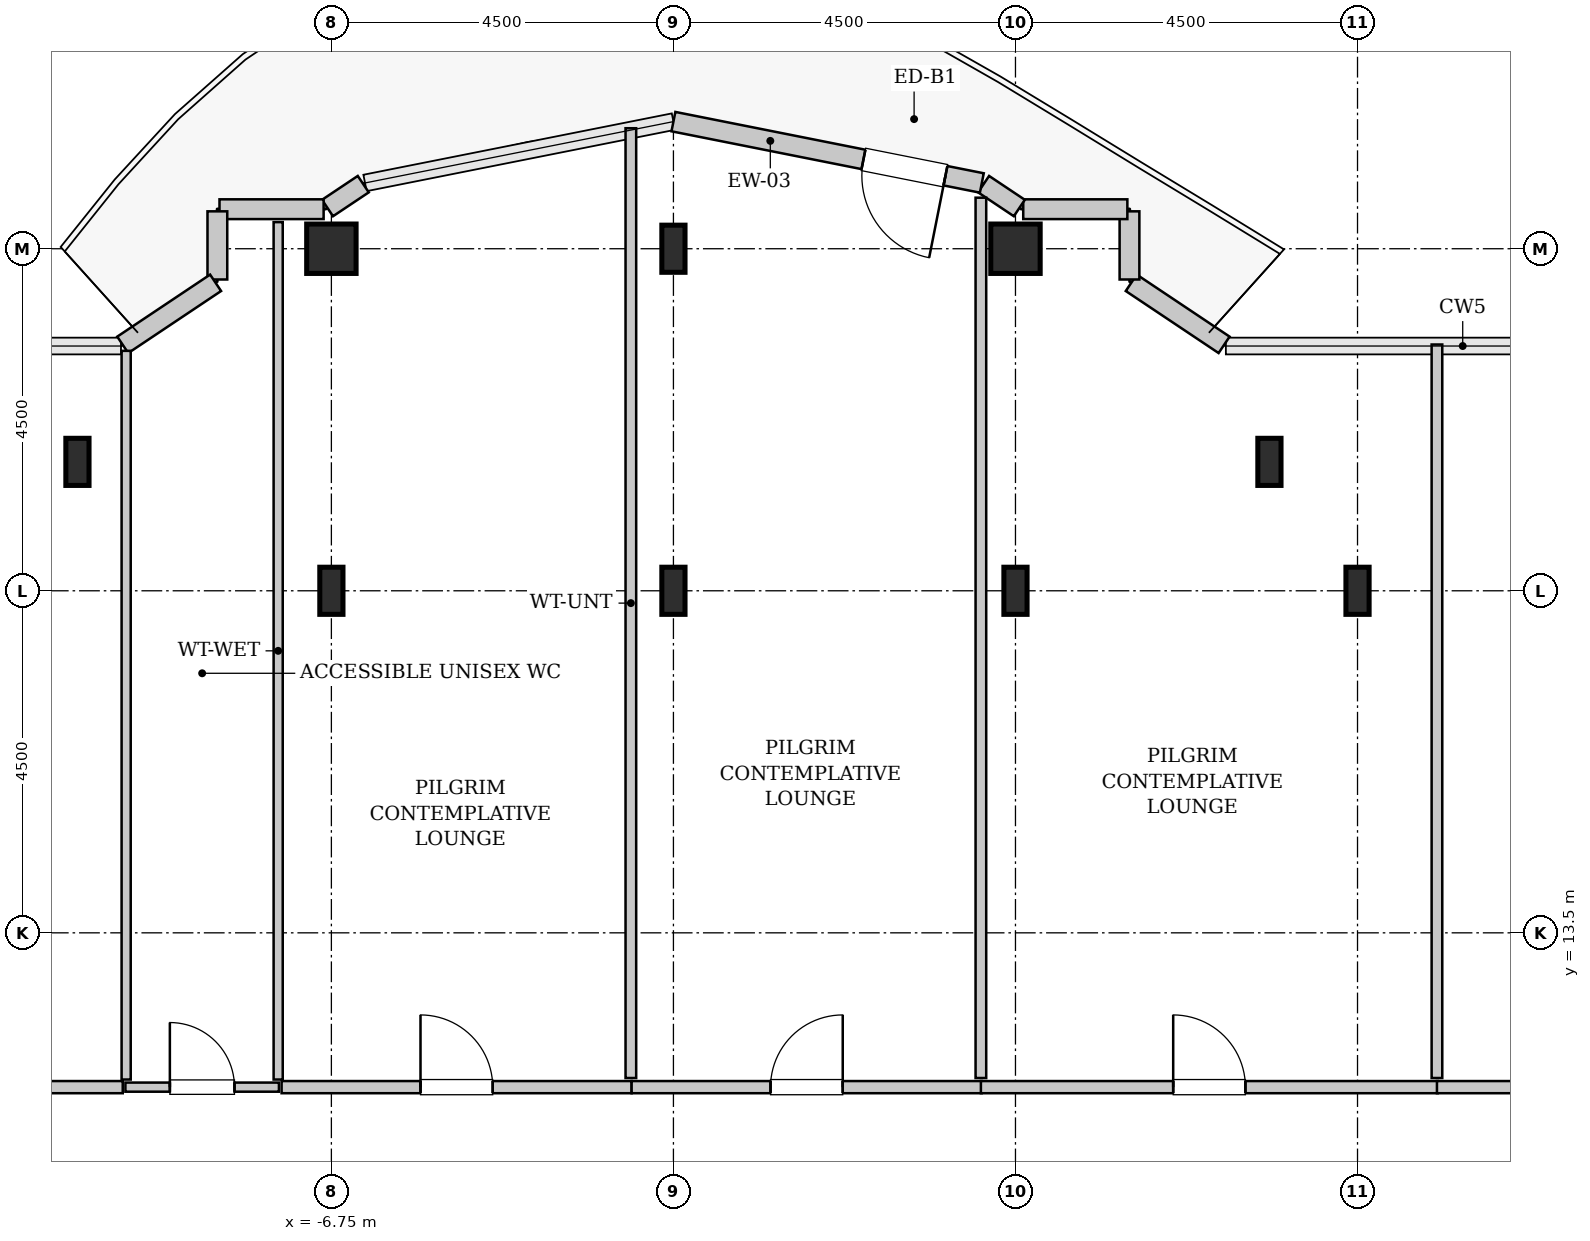
"""IFC4 building model, lengths in metres.
Left out: names, types, materials, properties, quantities, classifications, styles, units other than length and angle.
Written with IfcOpenShell. Run it as: python <this file> out.ifc"""

import sys

from ifc_helpers import new_model, si_unit, direction, frame, frame_2d, origin, origin_2d, place, context, subcontext, project, spatial, rectangle, hollow_rectangle, i_section, extrude, source, transform, mapped, element, fill, save


model = new_model("IFC4")
c1 = context("Model", 3, precision=1e-05, world=origin(), true_north=direction((0.0, 1.0)))
c2 = subcontext(c1, "Body", "Model", "MODEL_VIEW")
j1 = project(units=[si_unit("LENGTHUNIT", "METRE"), si_unit("PLANEANGLEUNIT", "RADIAN")], contexts=[c1])
p1 = place(None, origin())
s1 = spatial("IfcSite", under=j1, at=p1, CompositionType="ELEMENT")
p2 = place(p1, origin())
s2 = spatial("IfcBuilding", under=s1, at=p2, CompositionType="ELEMENT")
p3 = place(p2, frame((0.0, 0.0, 287.4)))
s3 = spatial("IfcBuildingStorey", under=s2, at=p3, CompositionType="ELEMENT", Elevation=287.4)
m1 = source(origin(), c2, "Body", "SweptSolid", [
    extrude(i_section(OverallWidth=0.305, OverallDepth=0.62, WebThickness=0.021, FlangeThickness=0.04, FilletRadius=0.027, at=origin_2d()), origin(), (0.0, 0.0, 1.0), 3.8),
])
for number, where, z_axis, x_axis in (
    (1, (-10.091, 19.696, 0.0), (0.0, 0.0, 1.0), (1.0, 0.0, 0.0)),
    (2, (-6.75, 18.0, 0.0), (0.0, 0.0, 1.0), (1.0, 0.0, 0.0)),
):
    element("IfcColumn", number, at=place(p3, frame(where, z_axis=z_axis, x_axis=x_axis)), inside=s3, PredefinedType="COLUMN", context=c2, shape_type="MappedRepresentation", body=[
        mapped(m1, transform((0.0, 0.0, 0.0), x_axis=(1.0, 0.0, 0.0), y_axis=(0.0, 1.0, 0.0), z_axis=(0.0, 0.0, 1.0), scale=1.0)),
    ])
m2 = source(origin(), c2, "Body", "SweptSolid", [
    extrude(hollow_rectangle(XDim=0.65, YDim=0.65, WallThickness=0.032, InnerFilletRadius=0.032, OuterFilletRadius=0.064, at=origin_2d()), origin(), (0.0, 0.0, 1.0), 3.8),
])
p4 = place(p3, frame((-6.75, 22.5, 0.0), z_axis=(0.0, 0.0, 1.0), x_axis=(1.0, 0.0, 0.0)))
e3 = element("IfcColumn", 3, at=p4, inside=s3, PredefinedType="COLUMN", context=c2, shape_type="MappedRepresentation", body=[
    mapped(m2, transform((0.0, 0.0, 0.0), x_axis=(1.0, 0.0, 0.0), y_axis=(0.0, 1.0, 0.0), z_axis=(0.0, 0.0, 1.0), scale=1.0)),
])
for number, where, z_axis, x_axis in (
    (4, (-2.25, 18.0, 0.0), (0.0, 0.0, 1.0), (1.0, 0.0, 0.0)),
    (5, (-2.25, 22.5, 0.0), (0.0, 0.0, 1.0), (1.0, 0.0, 0.0)),
    (6, (2.25, 18.0, 0.0), (0.0, 0.0, 1.0), (1.0, 0.0, 0.0)),
):
    element("IfcColumn", number, at=place(p3, frame(where, z_axis=z_axis, x_axis=x_axis)), inside=s3, PredefinedType="COLUMN", context=c2, shape_type="MappedRepresentation", body=[
        mapped(m1, transform((0.0, 0.0, 0.0), x_axis=(1.0, 0.0, 0.0), y_axis=(0.0, 1.0, 0.0), z_axis=(0.0, 0.0, 1.0), scale=1.0)),
    ])
p5 = place(p3, frame((2.25, 22.5, 0.0), z_axis=(0.0, 0.0, 1.0), x_axis=(1.0, 0.0, 0.0)))
e7 = element("IfcColumn", 7, at=p5, inside=s3, PredefinedType="COLUMN", context=c2, shape_type="MappedRepresentation", body=[
    mapped(m2, transform((0.0, 0.0, 0.0), x_axis=(1.0, 0.0, 0.0), y_axis=(0.0, 1.0, 0.0), z_axis=(0.0, 0.0, 1.0), scale=1.0)),
])
for number, where, z_axis, x_axis in (
    (8, (5.591, 19.696, 0.0), (0.0, 0.0, 1.0), (1.0, 0.0, 0.0)),
    (9, (6.75, 18.0, 0.0), (0.0, 0.0, 1.0), (1.0, 0.0, 0.0)),
):
    element("IfcColumn", number, at=place(p3, frame(where, z_axis=z_axis, x_axis=x_axis)), inside=s3, PredefinedType="COLUMN", context=c2, shape_type="MappedRepresentation", body=[
        mapped(m1, transform((0.0, 0.0, 0.0), x_axis=(1.0, 0.0, 0.0), y_axis=(0.0, 1.0, 0.0), z_axis=(0.0, 0.0, 1.0), scale=1.0)),
    ])
m3 = source(origin(), c2, "Body", "SweptSolid", [
    extrude(rectangle(XDim=1.469, YDim=0.26, at=frame_2d((0.734, 0.0))), origin(), (0.0, 0.0, 1.0), 3.55),
])
p6 = place(p3, frame((4.995, 21.236, 0.0), z_axis=(0.0, 0.0, 1.0), x_axis=(-0.831461760506, 0.555581983884, 0.0)))
e10 = element("IfcWall", 10, at=p6, inside=s3, PredefinedType="SOLIDWALL", context=c2, shape_type="MappedRepresentation", body=[
    mapped(m3, transform((0.0, 0.0, 0.0), x_axis=(1.0, 0.0, 0.0), y_axis=(0.0, 1.0, 0.0), z_axis=(0.0, 0.0, 1.0), scale=1.0)),
])
m4 = source(origin(), c2, "Body", "SweptSolid", [
    extrude(rectangle(XDim=0.897, YDim=0.26, at=frame_2d((0.448, 0.0))), origin(), (0.0, 0.0, 1.0), 3.55),
])
p7 = place(p3, frame((3.75, 22.095, 0.0), z_axis=(0.0, 0.0, 1.0), x_axis=(0.0, 1.0, 0.0)))
e11 = element("IfcWall", 11, at=p7, inside=s3, PredefinedType="SOLIDWALL", context=c2, shape_type="MappedRepresentation", body=[
    mapped(m4, transform((0.0, 0.0, 0.0), x_axis=(1.0, 0.0, 0.0), y_axis=(0.0, 1.0, 0.0), z_axis=(0.0, 0.0, 1.0), scale=1.0)),
])
m5 = source(origin(), c2, "Body", "SweptSolid", [
    extrude(rectangle(XDim=1.37, YDim=0.26, at=frame_2d((0.685, 0.0))), origin(), (0.0, 0.0, 1.0), 3.55),
])
p8 = place(p3, frame((3.722, 23.02, 0.0), z_axis=(0.0, 0.0, 1.0), x_axis=(-1.0, 0.0, 0.0)))
e12 = element("IfcWall", 12, at=p8, inside=s3, PredefinedType="SOLIDWALL", context=c2, shape_type="MappedRepresentation", body=[
    mapped(m5, transform((0.0, 0.0, 0.0), x_axis=(1.0, 0.0, 0.0), y_axis=(0.0, 1.0, 0.0), z_axis=(0.0, 0.0, 1.0), scale=1.0)),
])
m6 = source(origin(), c2, "Body", "SweptSolid", [
    extrude(rectangle(XDim=0.565, YDim=0.26, at=frame_2d((0.283, 0.0))), origin(), (0.0, 0.0, 1.0), 3.55),
])
p9 = place(p3, frame((2.301, 23.036, 0.0), z_axis=(0.0, 0.0, 1.0), x_axis=(-0.831651492666, 0.555297933317, 0.0)))
e13 = element("IfcWall", 13, at=p9, inside=s3, PredefinedType="SOLIDWALL", context=c2, shape_type="MappedRepresentation", body=[
    mapped(m6, transform((0.0, 0.0, 0.0), x_axis=(1.0, 0.0, 0.0), y_axis=(0.0, 1.0, 0.0), z_axis=(0.0, 0.0, 1.0), scale=1.0)),
])
m7 = source(origin(), c2, "Body", "SweptSolid", [
    extrude(rectangle(XDim=4.137, YDim=0.26, at=frame_2d((2.068, 0.0))), origin(), (0.0, 0.0, 1.0), 3.55),
])
p10 = place(p3, frame((1.807, 23.365, 0.0), z_axis=(0.0, 0.0, 1.0), x_axis=(-0.980782170794, 0.195105954428, 0.0)))
e14 = element("IfcWall", 14, at=p10, inside=s3, PredefinedType="SOLIDWALL", context=c2, shape_type="MappedRepresentation", body=[
    mapped(m7, transform((0.0, 0.0, 0.0), x_axis=(1.0, 0.0, 0.0), y_axis=(0.0, 1.0, 0.0), z_axis=(0.0, 0.0, 1.0), scale=1.0)),
])
p11 = place(p10, frame((0.488, 0.0, 0.0)))
e15 = element("IfcOpeningElement", 15, at=p11, cuts=e14, PredefinedType="OPENING", context=c2, shape_type="SweptSolid", body=[
    extrude(rectangle(XDim=1.1, YDim=2.2, at=frame_2d((0.55, 1.1))), frame((0.0, 0.14, 0.0), z_axis=(0.0, -1.0, 0.0), x_axis=(1.0, 0.0, 0.0)), (0.0, 0.0, 1.0), 0.28),
])
p12 = place(p3, frame((-6.331, 23.35, 0.0), z_axis=(0.0, 0.0, 1.0), x_axis=(-0.831651492666, -0.555297933317, 0.0)))
e16 = element("IfcWall", 16, at=p12, inside=s3, PredefinedType="SOLIDWALL", context=c2, shape_type="MappedRepresentation", body=[
    mapped(m6, transform((0.0, 0.0, 0.0), x_axis=(1.0, 0.0, 0.0), y_axis=(0.0, 1.0, 0.0), z_axis=(0.0, 0.0, 1.0), scale=1.0)),
])
p13 = place(p3, frame((-6.852, 23.02, 0.0), z_axis=(0.0, 0.0, 1.0), x_axis=(-1.0, 0.0, 0.0)))
e17 = element("IfcWall", 17, at=p13, inside=s3, PredefinedType="SOLIDWALL", context=c2, shape_type="MappedRepresentation", body=[
    mapped(m5, transform((0.0, 0.0, 0.0), x_axis=(1.0, 0.0, 0.0), y_axis=(0.0, 1.0, 0.0), z_axis=(0.0, 0.0, 1.0), scale=1.0)),
])
p14 = place(p3, frame((-8.25, 22.992, 0.0), z_axis=(0.0, 0.0, 1.0), x_axis=(0.0, -1.0, 0.0)))
e18 = element("IfcWall", 18, at=p14, inside=s3, PredefinedType="SOLIDWALL", context=c2, shape_type="MappedRepresentation", body=[
    mapped(m4, transform((0.0, 0.0, 0.0), x_axis=(1.0, 0.0, 0.0), y_axis=(0.0, 1.0, 0.0), z_axis=(0.0, 0.0, 1.0), scale=1.0)),
])
p15 = place(p3, frame((-8.273, 22.052, 0.0), z_axis=(0.0, 0.0, 1.0), x_axis=(-0.831461760506, -0.555581983884, 0.0)))
e19 = element("IfcWall", 19, at=p15, inside=s3, PredefinedType="SOLIDWALL", context=c2, shape_type="MappedRepresentation", body=[
    mapped(m3, transform((0.0, 0.0, 0.0), x_axis=(1.0, 0.0, 0.0), y_axis=(0.0, 1.0, 0.0), z_axis=(0.0, 0.0, 1.0), scale=1.0)),
])
m8 = source(origin(), c2, "Body", "SweptSolid", [
    extrude(rectangle(XDim=2.02, YDim=0.12, at=frame_2d((1.01, 0.0))), origin(), (0.0, 0.0, 1.0), 3.535),
])
p16 = place(p3, frame((-9.46, 11.47, 0.0), z_axis=(0.0, 0.0, 1.0), x_axis=(1.0, 0.0, 0.0)))
e20 = element("IfcWall", 20, at=p16, inside=s3, PredefinedType="PLUMBINGWALL", context=c2, shape_type="MappedRepresentation", body=[
    mapped(m8, transform((0.0, 0.0, 0.0), x_axis=(1.0, 0.0, 0.0), y_axis=(0.0, 1.0, 0.0), z_axis=(0.0, 0.0, 1.0), scale=1.0)),
])
p17 = place(p16, frame((0.585, 0.0, 0.0)))
e21 = element("IfcOpeningElement", 21, at=p17, cuts=e20, PredefinedType="OPENING", context=c2, shape_type="SweptSolid", body=[
    extrude(rectangle(XDim=0.85, YDim=2.1, at=frame_2d((0.425, 1.05))), frame((0.0, 0.07, 0.0), z_axis=(0.0, -1.0, 0.0), x_axis=(1.0, 0.0, 0.0)), (0.0, 0.0, 1.0), 0.14),
])
m9 = source(origin(), c2, "Body", "SweptSolid", [
    extrude(rectangle(XDim=11.28, YDim=0.12, at=frame_2d((5.64, 0.0))), origin(), (0.0, 0.0, 1.0), 3.535),
])
p18 = place(p3, frame((-7.45, 11.57, 0.0), z_axis=(0.0, 0.0, 1.0), x_axis=(0.0, 1.0, 0.0)))
e22 = element("IfcWall", 22, at=p18, inside=s3, PredefinedType="PLUMBINGWALL", context=c2, shape_type="MappedRepresentation", body=[
    mapped(m9, transform((0.0, 0.0, 0.0), x_axis=(1.0, 0.0, 0.0), y_axis=(0.0, 1.0, 0.0), z_axis=(0.0, 0.0, 1.0), scale=1.0)),
])
m10 = source(origin(), c2, "Body", "SweptSolid", [
    extrude(rectangle(XDim=9.587, YDim=0.12, at=frame_2d((4.793, 0.0))), origin(), (0.0, 0.0, 1.0), 3.535),
])
p19 = place(p3, frame((-9.45, 11.57, 0.0), z_axis=(0.0, 0.0, 1.0), x_axis=(0.0, 1.0, 0.0)))
e23 = element("IfcWall", 23, at=p19, inside=s3, PredefinedType="PLUMBINGWALL", context=c2, shape_type="MappedRepresentation", body=[
    mapped(m10, transform((0.0, 0.0, 0.0), x_axis=(1.0, 0.0, 0.0), y_axis=(0.0, 1.0, 0.0), z_axis=(0.0, 0.0, 1.0), scale=1.0)),
])
m11 = source(origin(), c2, "Body", "SweptSolid", [
    extrude(rectangle(XDim=4.125, YDim=0.16, at=frame_2d((2.062, 0.0))), origin(), (0.0, 0.0, 1.0), 3.535),
])
p20 = place(p3, frame((-13.62, 11.47, 0.0), z_axis=(0.0, 0.0, 1.0), x_axis=(1.0, 0.0, 0.0)))
e24 = element("IfcWall", 24, at=p20, inside=s3, PredefinedType="PARTITIONING", context=c2, shape_type="MappedRepresentation", body=[
    mapped(m11, transform((0.0, 0.0, 0.0), x_axis=(1.0, 0.0, 0.0), y_axis=(0.0, 1.0, 0.0), z_axis=(0.0, 0.0, 1.0), scale=1.0)),
])
p21 = place(p20, frame((1.587, 0.0, 0.0)))
e25 = element("IfcOpeningElement", 25, at=p21, cuts=e24, PredefinedType="OPENING", context=c2, shape_type="SweptSolid", body=[
    extrude(rectangle(XDim=0.95, YDim=2.1, at=frame_2d((0.475, 1.05))), frame((0.0, 0.09, 0.0), z_axis=(0.0, -1.0, 0.0), x_axis=(1.0, 0.0, 0.0)), (0.0, 0.0, 1.0), 0.18),
])
m12 = source(origin(), c2, "Body", "SweptSolid", [
    extrude(rectangle(XDim=4.605, YDim=0.16, at=frame_2d((2.302, 0.0))), origin(), (0.0, 0.0, 1.0), 3.535),
])
p22 = place(p3, frame((-7.405, 11.47, 0.0), z_axis=(0.0, 0.0, 1.0), x_axis=(1.0, 0.0, 0.0)))
e26 = element("IfcWall", 26, at=p22, inside=s3, PredefinedType="PARTITIONING", context=c2, shape_type="MappedRepresentation", body=[
    mapped(m12, transform((0.0, 0.0, 0.0), x_axis=(1.0, 0.0, 0.0), y_axis=(0.0, 1.0, 0.0), z_axis=(0.0, 0.0, 1.0), scale=1.0)),
])
p23 = place(p22, frame((1.827, 0.0, 0.0)))
e27 = element("IfcOpeningElement", 27, at=p23, cuts=e26, PredefinedType="OPENING", context=c2, shape_type="SweptSolid", body=[
    extrude(rectangle(XDim=0.95, YDim=2.1, at=frame_2d((0.475, 1.05))), frame((0.0, 0.09, 0.0), z_axis=(0.0, -1.0, 0.0), x_axis=(1.0, 0.0, 0.0)), (0.0, 0.0, 1.0), 0.18),
])
m13 = source(origin(), c2, "Body", "SweptSolid", [
    extrude(rectangle(XDim=12.495, YDim=0.14, at=frame_2d((6.248, 0.0))), origin(), (0.0, 0.0, 1.0), 3.535),
])
p24 = place(p3, frame((-2.81, 11.59, 0.0), z_axis=(0.0, 0.0, 1.0), x_axis=(0.0, 1.0, 0.0)))
e28 = element("IfcWall", 28, at=p24, inside=s3, PredefinedType="PARTITIONING", context=c2, shape_type="MappedRepresentation", body=[
    mapped(m13, transform((0.0, 0.0, 0.0), x_axis=(1.0, 0.0, 0.0), y_axis=(0.0, 1.0, 0.0), z_axis=(0.0, 0.0, 1.0), scale=1.0)),
])
p25 = place(p3, frame((-2.8, 11.47, 0.0), z_axis=(0.0, 0.0, 1.0), x_axis=(1.0, 0.0, 0.0)))
e29 = element("IfcWall", 29, at=p25, inside=s3, PredefinedType="PARTITIONING", context=c2, shape_type="MappedRepresentation", body=[
    mapped(m12, transform((0.0, 0.0, 0.0), x_axis=(1.0, 0.0, 0.0), y_axis=(0.0, 1.0, 0.0), z_axis=(0.0, 0.0, 1.0), scale=1.0)),
])
p26 = place(p25, frame((1.827, 0.0, 0.0)))
e30 = element("IfcOpeningElement", 30, at=p26, cuts=e29, PredefinedType="OPENING", context=c2, shape_type="SweptSolid", body=[
    extrude(rectangle(XDim=0.95, YDim=2.1, at=frame_2d((0.475, 1.05))), frame((0.0, 0.09, 0.0), z_axis=(0.0, -1.0, 0.0), x_axis=(1.0, 0.0, 0.0)), (0.0, 0.0, 1.0), 0.18),
])
m14 = source(origin(), c2, "Body", "SweptSolid", [
    extrude(rectangle(XDim=11.581, YDim=0.14, at=frame_2d((5.791, 0.0))), origin(), (0.0, 0.0, 1.0), 2.925),
])
p27 = place(p3, frame((1.795, 11.59, 0.0), z_axis=(0.0, 0.0, 1.0), x_axis=(0.0, 1.0, 0.0)))
e31 = element("IfcWall", 31, at=p27, inside=s3, PredefinedType="PARTITIONING", context=c2, shape_type="MappedRepresentation", body=[
    mapped(m14, transform((0.0, 0.0, 0.0), x_axis=(1.0, 0.0, 0.0), y_axis=(0.0, 1.0, 0.0), z_axis=(0.0, 0.0, 1.0), scale=1.0)),
])
m15 = source(origin(), c2, "Body", "SweptSolid", [
    extrude(rectangle(XDim=6.01, YDim=0.16, at=frame_2d((3.005, 0.0))), origin(), (0.0, 0.0, 1.0), 3.535),
])
p28 = place(p3, frame((1.795, 11.47, 0.0), z_axis=(0.0, 0.0, 1.0), x_axis=(1.0, 0.0, 0.0)))
e32 = element("IfcWall", 32, at=p28, inside=s3, PredefinedType="PARTITIONING", context=c2, shape_type="MappedRepresentation", body=[
    mapped(m15, transform((0.0, 0.0, 0.0), x_axis=(1.0, 0.0, 0.0), y_axis=(0.0, 1.0, 0.0), z_axis=(0.0, 0.0, 1.0), scale=1.0)),
])
p29 = place(p28, frame((2.53, 0.0, 0.0)))
e33 = element("IfcOpeningElement", 33, at=p29, cuts=e32, PredefinedType="OPENING", context=c2, shape_type="SweptSolid", body=[
    extrude(rectangle(XDim=0.95, YDim=2.1, at=frame_2d((0.475, 1.05))), frame((0.0, 0.09, 0.0), z_axis=(0.0, -1.0, 0.0), x_axis=(1.0, 0.0, 0.0)), (0.0, 0.0, 1.0), 0.18),
])
m16 = source(origin(), c2, "Body", "SweptSolid", [
    extrude(rectangle(XDim=9.65, YDim=0.14, at=frame_2d((4.825, 0.0))), origin(), (0.0, 0.0, 1.0), 3.535),
])
p30 = place(p3, frame((7.795, 11.59, 0.0), z_axis=(0.0, 0.0, 1.0), x_axis=(0.0, 1.0, 0.0)))
e34 = element("IfcWall", 34, at=p30, inside=s3, PredefinedType="PARTITIONING", context=c2, shape_type="MappedRepresentation", body=[
    mapped(m16, transform((0.0, 0.0, 0.0), x_axis=(1.0, 0.0, 0.0), y_axis=(0.0, 1.0, 0.0), z_axis=(0.0, 0.0, 1.0), scale=1.0)),
])
m17 = source(origin(), c2, "Body", "SweptSolid", [
    extrude(rectangle(XDim=5.825, YDim=0.16, at=frame_2d((2.913, 0.0))), origin(), (0.0, 0.0, 1.0), 3.535),
])
p31 = place(p3, frame((7.795, 11.47, 0.0), z_axis=(0.0, 0.0, 1.0), x_axis=(1.0, 0.0, 0.0)))
e35 = element("IfcWall", 35, at=p31, inside=s3, PredefinedType="PARTITIONING", context=c2, shape_type="MappedRepresentation", body=[
    mapped(m17, transform((0.0, 0.0, 0.0), x_axis=(1.0, 0.0, 0.0), y_axis=(0.0, 1.0, 0.0), z_axis=(0.0, 0.0, 1.0), scale=1.0)),
])
p32 = place(p31, frame((2.438, 0.0, 0.0)))
e36 = element("IfcOpeningElement", 36, at=p32, cuts=e35, PredefinedType="OPENING", context=c2, shape_type="SweptSolid", body=[
    extrude(rectangle(XDim=0.95, YDim=2.1, at=frame_2d((0.475, 1.05))), frame((0.0, 0.09, 0.0), z_axis=(0.0, -1.0, 0.0), x_axis=(1.0, 0.0, 0.0)), (0.0, 0.0, 1.0), 0.18),
])
m18 = source(origin(), c2, "Body", "SweptSolid", [
    extrude(rectangle(XDim=1.1, YDim=2.2, at=frame_2d((0.55, 1.1))), frame((0.0, 0.025, 0.0), z_axis=(0.0, -1.0, 0.0), x_axis=(1.0, 0.0, 0.0)), (0.0, 0.0, 1.0), 0.05),
])
p33 = place(p11, origin())
e37 = element("IfcDoor", 37, at=p33, inside=s3, OperationType="SINGLE_SWING_LEFT", PredefinedType="DOOR", context=c2, shape_type="MappedRepresentation", body=[
    mapped(m18, transform((0.0, 0.0, 0.0), x_axis=(1.0, 0.0, 0.0), y_axis=(0.0, 1.0, 0.0), z_axis=(0.0, 0.0, 1.0), scale=1.0)),
])
fill(e15, e37)
m19 = source(origin(), c2, "Body", "SweptSolid", [
    extrude(rectangle(XDim=0.85, YDim=2.1, at=frame_2d((0.425, 1.05))), frame((0.0, 0.025, 0.0), z_axis=(0.0, -1.0, 0.0), x_axis=(1.0, 0.0, 0.0)), (0.0, 0.0, 1.0), 0.05),
])
p34 = place(p17, origin())
e38 = element("IfcDoor", 38, at=p34, inside=s3, OperationType="SINGLE_SWING_LEFT", PredefinedType="DOOR", context=c2, shape_type="MappedRepresentation", body=[
    mapped(m19, transform((0.0, 0.0, 0.0), x_axis=(1.0, 0.0, 0.0), y_axis=(0.0, 1.0, 0.0), z_axis=(0.0, 0.0, 1.0), scale=1.0)),
])
fill(e21, e38)
m20 = source(origin(), c2, "Body", "SweptSolid", [
    extrude(rectangle(XDim=0.95, YDim=2.1, at=frame_2d((0.475, 1.05))), frame((0.0, 0.025, 0.0), z_axis=(0.0, -1.0, 0.0), x_axis=(1.0, 0.0, 0.0)), (0.0, 0.0, 1.0), 0.05),
])
p35 = place(p23, origin())
e39 = element("IfcDoor", 39, at=p35, inside=s3, OperationType="SINGLE_SWING_LEFT", PredefinedType="DOOR", context=c2, shape_type="MappedRepresentation", body=[
    mapped(m20, transform((0.0, 0.0, 0.0), x_axis=(1.0, 0.0, 0.0), y_axis=(0.0, 1.0, 0.0), z_axis=(0.0, 0.0, 1.0), scale=1.0)),
])
fill(e27, e39)
p36 = place(p26, origin())
e40 = element("IfcDoor", 40, at=p36, inside=s3, OperationType="SINGLE_SWING_RIGHT", PredefinedType="DOOR", context=c2, shape_type="MappedRepresentation", body=[
    mapped(m20, transform((0.0, 0.0, 0.0), x_axis=(1.0, 0.0, 0.0), y_axis=(0.0, 1.0, 0.0), z_axis=(0.0, 0.0, 1.0), scale=1.0)),
])
fill(e30, e40)
p37 = place(p29, origin())
e41 = element("IfcDoor", 41, at=p37, inside=s3, OperationType="SINGLE_SWING_LEFT", PredefinedType="DOOR", context=c2, shape_type="MappedRepresentation", body=[
    mapped(m20, transform((0.0, 0.0, 0.0), x_axis=(1.0, 0.0, 0.0), y_axis=(0.0, 1.0, 0.0), z_axis=(0.0, 0.0, 1.0), scale=1.0)),
])
fill(e33, e41)
save(model, sys.argv[1])
